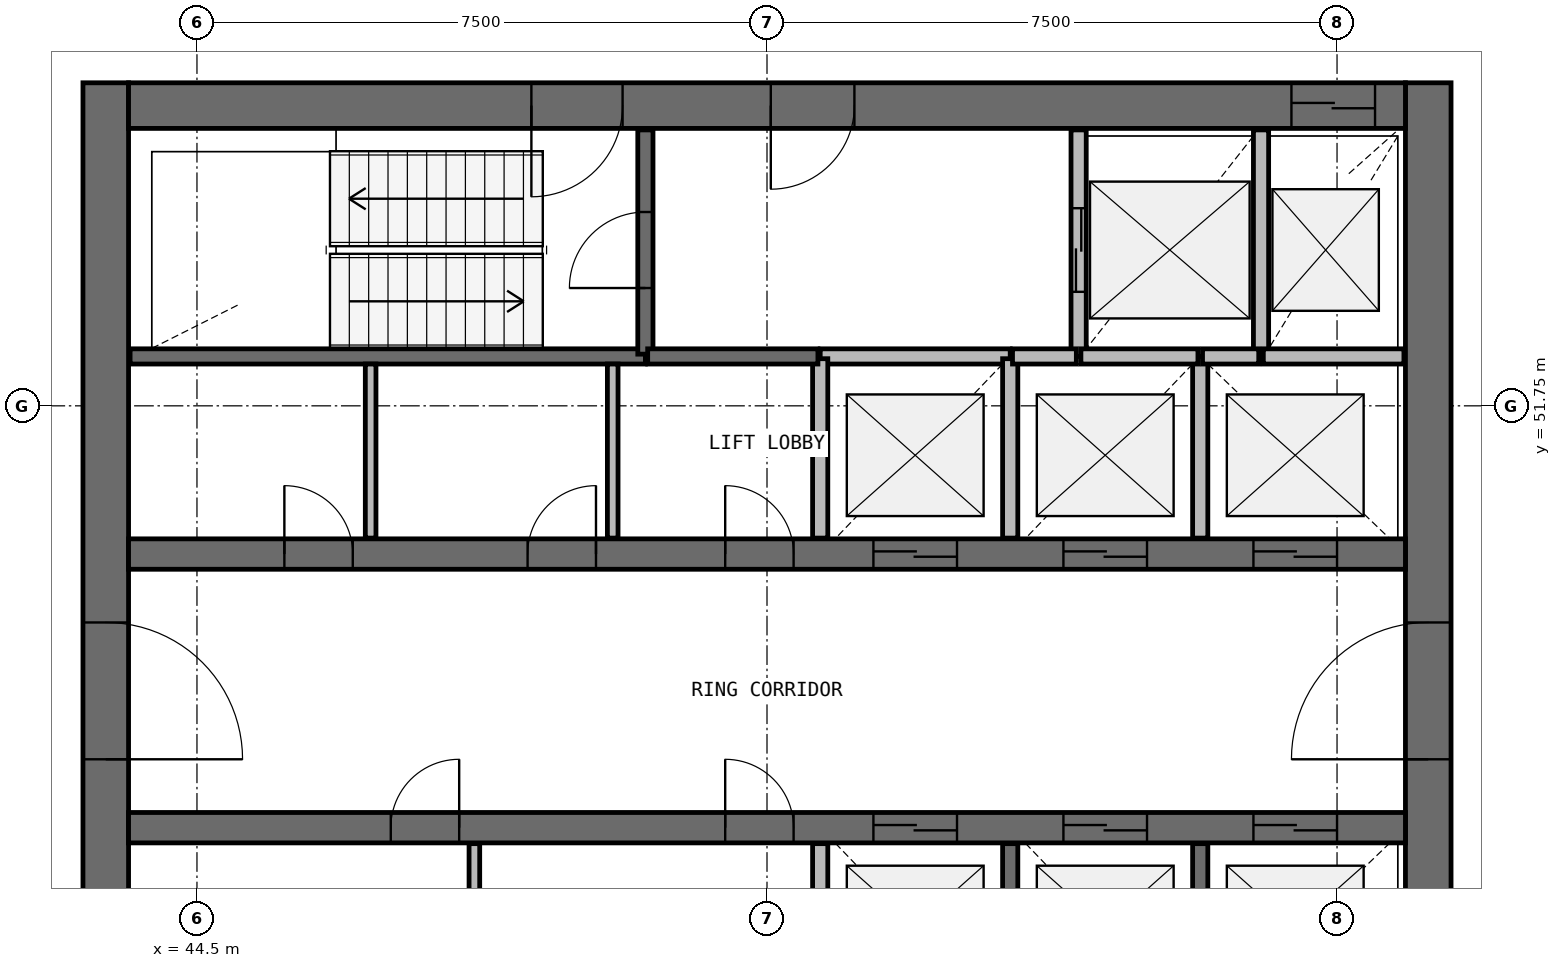
"""IFC4 building model, lengths in metres.
Left out: names, types, materials, properties, quantities, classifications, styles, units other than length and angle.
Written with IfcOpenShell. Run it as: python <this file> out.ifc"""

import sys

from ifc_helpers import new_model, si_unit, direction, frame, frame_2d, origin, place, context, subcontext, project, spatial, rectangle, extrude, source, transform, mapped, element, fill, save


model = new_model("IFC4")
c1 = context("Model", 3, precision=1e-05, world=origin(), true_north=direction((0.0, 1.0)))
c2 = subcontext(c1, "Body", "Model", "MODEL_VIEW")
j1 = project(units=[si_unit("LENGTHUNIT", "METRE"), si_unit("PLANEANGLEUNIT", "RADIAN")], contexts=[c1])
p1 = place(None, origin())
s1 = spatial("IfcSite", under=j1, at=p1, CompositionType="ELEMENT")
p2 = place(p1, origin())
s2 = spatial("IfcBuilding", under=s1, at=p2, CompositionType="ELEMENT")
p3 = place(p2, frame((0.0, 0.0, 242.3)))
s3 = spatial("IfcBuildingStorey", under=s2, at=p3, CompositionType="ELEMENT", Elevation=242.3)
p4 = place(p3, frame((60.7, 40.0, 0.0), z_axis=(0.0, 0.0, 1.0), x_axis=(0.0, 1.0, 0.0)))
e1 = element("IfcWall", 1, at=p4, inside=s3, PredefinedType="SHEAR", context=c2, shape_type="SweptSolid", body=[
    extrude(rectangle(XDim=16.0, YDim=0.6, at=frame_2d((8.0, 0.0))), origin(), (0.0, 0.0, 1.0), 3.9),
])
p5 = place(p4, frame((7.1, 0.0, 0.0)))
e2 = element("IfcOpeningElement", 2, at=p5, cuts=e1, PredefinedType="OPENING", context=c2, shape_type="SweptSolid", body=[
    extrude(rectangle(XDim=1.8, YDim=2.1, at=frame_2d((0.9, 1.05))), frame((0.0, 0.31, 0.0), z_axis=(0.0, -1.0, 0.0), x_axis=(1.0, 0.0, 0.0)), (0.0, 0.0, 1.0), 0.62),
])
p6 = place(p3, frame((43.3, 56.0, 0.0), z_axis=(0.0, 0.0, 1.0), x_axis=(0.0, -1.0, 0.0)))
e3 = element("IfcWall", 3, at=p6, inside=s3, PredefinedType="SHEAR", context=c2, shape_type="SweptSolid", body=[
    extrude(rectangle(XDim=16.0, YDim=0.6, at=frame_2d((8.0, 0.0))), origin(), (0.0, 0.0, 1.0), 3.9),
])
p7 = place(p6, frame((7.1, 0.0, 0.0)))
e4 = element("IfcOpeningElement", 4, at=p7, cuts=e3, PredefinedType="OPENING", context=c2, shape_type="SweptSolid", body=[
    extrude(rectangle(XDim=1.8, YDim=2.1, at=frame_2d((0.9, 1.05))), frame((0.0, 0.31, 0.0), z_axis=(0.0, -1.0, 0.0), x_axis=(1.0, 0.0, 0.0)), (0.0, 0.0, 1.0), 0.62),
])
p8 = place(p3, frame((60.4, 55.7, 0.0), z_axis=(0.0, 0.0, 1.0), x_axis=(-1.0, 0.0, 0.0)))
e5 = element("IfcWall", 5, at=p8, inside=s3, PredefinedType="SHEAR", context=c2, shape_type="SweptSolid", body=[
    extrude(rectangle(XDim=16.8, YDim=0.6, at=frame_2d((8.4, 0.0))), origin(), (0.0, 0.0, 1.0), 3.9),
])
p9 = place(p8, frame((0.4, 0.0, 0.0)))
e6 = element("IfcOpeningElement", 6, at=p9, cuts=e5, PredefinedType="OPENING", context=c2, shape_type="SweptSolid", body=[
    extrude(rectangle(XDim=1.1, YDim=2.1, at=frame_2d((0.55, 1.05))), frame((0.0, 0.31, 0.0), z_axis=(0.0, -1.0, 0.0), x_axis=(1.0, 0.0, 0.0)), (0.0, 0.0, 1.0), 0.62),
])
p10 = place(p8, frame((10.3, 0.0, 0.0)))
e7 = element("IfcOpeningElement", 7, at=p10, cuts=e5, PredefinedType="OPENING", context=c2, shape_type="SweptSolid", body=[
    extrude(rectangle(XDim=1.2, YDim=2.1, at=frame_2d((0.6, 1.05))), frame((0.0, 0.31, 0.0), z_axis=(0.0, -1.0, 0.0), x_axis=(1.0, 0.0, 0.0)), (0.0, 0.0, 1.0), 0.62),
])
p11 = place(p8, frame((7.25, 0.0, 0.0)))
e8 = element("IfcOpeningElement", 8, at=p11, cuts=e5, PredefinedType="OPENING", context=c2, shape_type="SweptSolid", body=[
    extrude(rectangle(XDim=1.1, YDim=2.1, at=frame_2d((0.55, 1.05))), frame((0.0, 0.31, 0.0), z_axis=(0.0, -1.0, 0.0), x_axis=(1.0, 0.0, 0.0)), (0.0, 0.0, 1.0), 0.62),
])
p12 = place(p3, frame((43.6, 49.8, 0.0), z_axis=(0.0, 0.0, 1.0), x_axis=(1.0, 0.0, 0.0)))
e9 = element("IfcWall", 9, at=p12, inside=s3, PredefinedType="SHEAR", context=c2, shape_type="SweptSolid", body=[
    extrude(rectangle(XDim=16.8, YDim=0.4, at=frame_2d((8.4, 0.0))), origin(), (0.0, 0.0, 1.0), 3.9),
])
p13 = place(p12, frame((9.8, 0.0, 0.0)))
e10 = element("IfcOpeningElement", 10, at=p13, cuts=e9, PredefinedType="OPENING", context=c2, shape_type="SweptSolid", body=[
    extrude(rectangle(XDim=1.1, YDim=2.1, at=frame_2d((0.55, 1.05))), frame((0.0, 0.21, 0.0), z_axis=(0.0, -1.0, 0.0), x_axis=(1.0, 0.0, 0.0)), (0.0, 0.0, 1.0), 0.42),
])
p14 = place(p12, frame((12.3, 0.0, 0.0)))
e11 = element("IfcOpeningElement", 11, at=p14, cuts=e9, PredefinedType="OPENING", context=c2, shape_type="SweptSolid", body=[
    extrude(rectangle(XDim=1.1, YDim=2.1, at=frame_2d((0.55, 1.05))), frame((0.0, 0.21, 0.0), z_axis=(0.0, -1.0, 0.0), x_axis=(1.0, 0.0, 0.0)), (0.0, 0.0, 1.0), 0.42),
])
p15 = place(p12, frame((14.8, 0.0, 0.0)))
e12 = element("IfcOpeningElement", 12, at=p15, cuts=e9, PredefinedType="OPENING", context=c2, shape_type="SweptSolid", body=[
    extrude(rectangle(XDim=1.1, YDim=2.1, at=frame_2d((0.55, 1.05))), frame((0.0, 0.21, 0.0), z_axis=(0.0, -1.0, 0.0), x_axis=(1.0, 0.0, 0.0)), (0.0, 0.0, 1.0), 0.42),
])
p16 = place(p12, frame((2.05, 0.0, 0.0)))
e13 = element("IfcOpeningElement", 13, at=p16, cuts=e9, PredefinedType="OPENING", context=c2, shape_type="SweptSolid", body=[
    extrude(rectangle(XDim=0.9, YDim=2.1, at=frame_2d((0.45, 1.05))), frame((0.0, 0.21, 0.0), z_axis=(0.0, -1.0, 0.0), x_axis=(1.0, 0.0, 0.0)), (0.0, 0.0, 1.0), 0.42),
])
p17 = place(p12, frame((5.25, 0.0, 0.0)))
e14 = element("IfcOpeningElement", 14, at=p17, cuts=e9, PredefinedType="OPENING", context=c2, shape_type="SweptSolid", body=[
    extrude(rectangle(XDim=0.9, YDim=2.1, at=frame_2d((0.45, 1.05))), frame((0.0, 0.21, 0.0), z_axis=(0.0, -1.0, 0.0), x_axis=(1.0, 0.0, 0.0)), (0.0, 0.0, 1.0), 0.42),
])
p18 = place(p12, frame((7.85, 0.0, 0.0)))
e15 = element("IfcOpeningElement", 15, at=p18, cuts=e9, PredefinedType="OPENING", context=c2, shape_type="SweptSolid", body=[
    extrude(rectangle(XDim=0.9, YDim=2.1, at=frame_2d((0.45, 1.05))), frame((0.0, 0.21, 0.0), z_axis=(0.0, -1.0, 0.0), x_axis=(1.0, 0.0, 0.0)), (0.0, 0.0, 1.0), 0.42),
])
p19 = place(p3, frame((43.6, 46.2, 0.0), z_axis=(0.0, 0.0, 1.0), x_axis=(1.0, 0.0, 0.0)))
e16 = element("IfcWall", 16, at=p19, inside=s3, PredefinedType="SHEAR", context=c2, shape_type="SweptSolid", body=[
    extrude(rectangle(XDim=16.8, YDim=0.4, at=frame_2d((8.4, 0.0))), origin(), (0.0, 0.0, 1.0), 3.9),
])
p20 = place(p19, frame((9.8, 0.0, 0.0)))
e17 = element("IfcOpeningElement", 17, at=p20, cuts=e16, PredefinedType="OPENING", context=c2, shape_type="SweptSolid", body=[
    extrude(rectangle(XDim=1.1, YDim=2.1, at=frame_2d((0.55, 1.05))), frame((0.0, 0.21, 0.0), z_axis=(0.0, -1.0, 0.0), x_axis=(1.0, 0.0, 0.0)), (0.0, 0.0, 1.0), 0.42),
])
p21 = place(p19, frame((12.3, 0.0, 0.0)))
e18 = element("IfcOpeningElement", 18, at=p21, cuts=e16, PredefinedType="OPENING", context=c2, shape_type="SweptSolid", body=[
    extrude(rectangle(XDim=1.1, YDim=2.1, at=frame_2d((0.55, 1.05))), frame((0.0, 0.21, 0.0), z_axis=(0.0, -1.0, 0.0), x_axis=(1.0, 0.0, 0.0)), (0.0, 0.0, 1.0), 0.42),
])
p22 = place(p19, frame((14.8, 0.0, 0.0)))
e19 = element("IfcOpeningElement", 19, at=p22, cuts=e16, PredefinedType="OPENING", context=c2, shape_type="SweptSolid", body=[
    extrude(rectangle(XDim=1.1, YDim=2.1, at=frame_2d((0.55, 1.05))), frame((0.0, 0.21, 0.0), z_axis=(0.0, -1.0, 0.0), x_axis=(1.0, 0.0, 0.0)), (0.0, 0.0, 1.0), 0.42),
])
p23 = place(p19, frame((3.45, 0.0, 0.0)))
e20 = element("IfcOpeningElement", 20, at=p23, cuts=e16, PredefinedType="OPENING", context=c2, shape_type="SweptSolid", body=[
    extrude(rectangle(XDim=0.9, YDim=2.1, at=frame_2d((0.45, 1.05))), frame((0.0, 0.21, 0.0), z_axis=(0.0, -1.0, 0.0), x_axis=(1.0, 0.0, 0.0)), (0.0, 0.0, 1.0), 0.42),
])
p24 = place(p19, frame((7.85, 0.0, 0.0)))
e21 = element("IfcOpeningElement", 21, at=p24, cuts=e16, PredefinedType="OPENING", context=c2, shape_type="SweptSolid", body=[
    extrude(rectangle(XDim=0.9, YDim=2.1, at=frame_2d((0.45, 1.05))), frame((0.0, 0.21, 0.0), z_axis=(0.0, -1.0, 0.0), x_axis=(1.0, 0.0, 0.0)), (0.0, 0.0, 1.0), 0.42),
])
p25 = place(p3, frame((43.62, 52.4, 0.0), z_axis=(0.0, 0.0, 1.0), x_axis=(1.0, 0.0, 0.0)))
e22 = element("IfcWall", 22, at=p25, inside=s3, PredefinedType="SOLIDWALL", context=c2, shape_type="SweptSolid", body=[
    extrude(rectangle(XDim=6.78, YDim=0.2, at=frame_2d((3.39, 0.0))), origin(), (0.0, 0.0, 1.0), 3.58),
])
p26 = place(p3, frame((50.4, 52.43, 0.0), z_axis=(0.0, 0.0, 1.0), x_axis=(0.0, 1.0, 0.0)))
e23 = element("IfcWall", 23, at=p26, inside=s3, PredefinedType="SOLIDWALL", context=c2, shape_type="SweptSolid", body=[
    extrude(rectangle(XDim=2.95, YDim=0.2, at=frame_2d((1.475, 0.0))), origin(), (0.0, 0.0, 1.0), 3.58),
])
p27 = place(p26, frame((0.87, 0.0, 0.0)))
e24 = element("IfcOpeningElement", 24, at=p27, cuts=e23, PredefinedType="OPENING", context=c2, shape_type="SweptSolid", body=[
    extrude(rectangle(XDim=1.0, YDim=2.1, at=frame_2d((0.5, 1.05))), frame((0.0, 0.11, 0.0), z_axis=(0.0, -1.0, 0.0), x_axis=(1.0, 0.0, 0.0)), (0.0, 0.0, 1.0), 0.22),
])
p28 = place(p3, frame((56.1, 55.38, 0.0), z_axis=(0.0, 0.0, 1.0), x_axis=(0.0, -1.0, 0.0)))
e25 = element("IfcWall", 25, at=p28, inside=s3, PredefinedType="SOLIDWALL", context=c2, shape_type="SweptSolid", body=[
    extrude(rectangle(XDim=2.98, YDim=0.2, at=frame_2d((1.49, 0.0))), origin(), (0.0, 0.0, 1.0), 3.58),
])
p29 = place(p28, frame((1.03, 0.0, 0.0)))
e26 = element("IfcOpeningElement", 26, at=p29, cuts=e25, PredefinedType="OPENING", context=c2, shape_type="SweptSolid", body=[
    extrude(rectangle(XDim=1.1, YDim=2.1, at=frame_2d((0.55, 1.05))), frame((0.0, 0.11, 0.0), z_axis=(0.0, -1.0, 0.0), x_axis=(1.0, 0.0, 0.0)), (0.0, 0.0, 1.0), 0.22),
])
p30 = place(p3, frame((58.5, 52.4, 0.0), z_axis=(0.0, 0.0, 1.0), x_axis=(0.0, 1.0, 0.0)))
e27 = element("IfcWall", 27, at=p30, inside=s3, PredefinedType="SOLIDWALL", context=c2, shape_type="SweptSolid", body=[
    extrude(rectangle(XDim=2.98, YDim=0.2, at=frame_2d((1.49, 0.0))), origin(), (0.0, 0.0, 1.0), 3.58),
])
p31 = place(p3, frame((55.2, 52.4, 0.0), z_axis=(0.0, 0.0, 1.0), x_axis=(-1.0, 0.0, 0.0)))
e28 = element("IfcWall", 28, at=p31, inside=s3, PredefinedType="SOLIDWALL", context=c2, shape_type="SweptSolid", body=[
    extrude(rectangle(XDim=2.5, YDim=0.2, at=frame_2d((1.25, 0.0))), origin(), (0.0, 0.0, 1.0), 3.58),
])
for number, where, z_axis, x_axis in (
    (29, (52.7, 45.99, 0.0), (0.0, 0.0, 1.0), (0.0, -1.0, 0.0)),
    (30, (52.7, 52.37, 0.0), (0.0, 0.0, 1.0), (0.0, -1.0, 0.0)),
    (31, (55.2, 43.63, 0.0), (0.0, 0.0, 1.0), (0.0, 1.0, 0.0)),
    (32, (55.2, 50.01, 0.0), (0.0, 0.0, 1.0), (0.0, 1.0, 0.0)),
    (33, (57.7, 43.63, 0.0), (0.0, 0.0, 1.0), (0.0, 1.0, 0.0)),
):
    element("IfcWall", number, at=place(p3, frame(where, z_axis=z_axis, x_axis=x_axis)), inside=s3, PredefinedType="SOLIDWALL", context=c2, shape_type="SweptSolid", body=[
        extrude(rectangle(XDim=2.36, YDim=0.2, at=frame_2d((1.18, 0.0))), origin(), (0.0, 0.0, 1.0), 3.58),
    ])
p32 = place(p3, frame((57.7, 50.01, 0.0), z_axis=(0.0, 0.0, 1.0), x_axis=(0.0, 1.0, 0.0)))
e34 = element("IfcWall", 34, at=p32, inside=s3, PredefinedType="SOLIDWALL", context=c2, shape_type="SweptSolid", body=[
    extrude(rectangle(XDim=2.39, YDim=0.2, at=frame_2d((1.195, 0.0))), origin(), (0.0, 0.0, 1.0), 3.58),
])
p33 = place(p3, frame((50.43, 52.4, 0.0), z_axis=(0.0, 0.0, 1.0), x_axis=(1.0, 0.0, 0.0)))
e35 = element("IfcWall", 35, at=p33, inside=s3, PredefinedType="SOLIDWALL", context=c2, shape_type="SweptSolid", body=[
    extrude(rectangle(XDim=2.24, YDim=0.2, at=frame_2d((1.12, 0.0))), origin(), (0.0, 0.0, 1.0), 3.58),
])
p34 = place(p3, frame((60.38, 52.4, 0.0), z_axis=(0.0, 0.0, 1.0), x_axis=(-1.0, 0.0, 0.0)))
e36 = element("IfcWall", 36, at=p34, inside=s3, PredefinedType="SOLIDWALL", context=c2, shape_type="SweptSolid", body=[
    extrude(rectangle(XDim=1.85, YDim=0.2, at=frame_2d((0.925, 0.0))), origin(), (0.0, 0.0, 1.0), 3.58),
])
p35 = place(p3, frame((57.67, 52.4, 0.0), z_axis=(0.0, 0.0, 1.0), x_axis=(-1.0, 0.0, 0.0)))
e37 = element("IfcWall", 37, at=p35, inside=s3, PredefinedType="SOLIDWALL", context=c2, shape_type="SweptSolid", body=[
    extrude(rectangle(XDim=1.54, YDim=0.2, at=frame_2d((0.77, 0.0))), origin(), (0.0, 0.0, 1.0), 3.58),
])
p36 = place(p3, frame((56.07, 52.4, 0.0), z_axis=(0.0, 0.0, 1.0), x_axis=(-1.0, 0.0, 0.0)))
e38 = element("IfcWall", 38, at=p36, inside=s3, PredefinedType="SOLIDWALL", context=c2, shape_type="SweptSolid", body=[
    extrude(rectangle(XDim=0.84, YDim=0.2, at=frame_2d((0.42, 0.0))), origin(), (0.0, 0.0, 1.0), 3.58),
])
p37 = place(p3, frame((58.47, 52.4, 0.0), z_axis=(0.0, 0.0, 1.0), x_axis=(-1.0, 0.0, 0.0)))
e39 = element("IfcWall", 39, at=p37, inside=s3, PredefinedType="SOLIDWALL", context=c2, shape_type="SweptSolid", body=[
    extrude(rectangle(XDim=0.74, YDim=0.2, at=frame_2d((0.37, 0.0))), origin(), (0.0, 0.0, 1.0), 3.58),
])
for number, where, z_axis, x_axis in (
    (40, (46.785, 50.01, 0.0), (0.0, 0.0, 1.0), (0.0, 1.0, 0.0)),
    (41, (48.15, 43.7, 0.0), (0.0, 0.0, 1.0), (0.0, 1.0, 0.0)),
    (42, (49.97, 50.01, 0.0), (0.0, 0.0, 1.0), (0.0, 1.0, 0.0)),
):
    element("IfcWall", number, at=place(p3, frame(where, z_axis=z_axis, x_axis=x_axis)), inside=s3, PredefinedType="PARTITIONING", context=c2, shape_type="SweptSolid", body=[
        extrude(rectangle(XDim=2.29, YDim=0.14, at=frame_2d((1.145, 0.0))), origin(), (0.0, 0.0, 1.0), 2.88),
    ])
m1 = source(origin(), c2, "Body", "SweptSolid", [
    extrude(rectangle(XDim=1.8, YDim=2.1, at=frame_2d((0.9, 1.05))), frame((0.0, 0.025, 0.0), z_axis=(0.0, -1.0, 0.0), x_axis=(1.0, 0.0, 0.0)), (0.0, 0.0, 1.0), 0.05),
])
p38 = place(p7, origin())
e43 = element("IfcDoor", 43, at=p38, inside=s3, OperationType="SINGLE_SWING_RIGHT", PredefinedType="DOOR", context=c2, shape_type="MappedRepresentation", body=[
    mapped(m1, transform((0.0, 0.0, 0.0), scale=1.0)),
])
fill(e4, e43)
p39 = place(p5, origin())
e44 = element("IfcDoor", 44, at=p39, inside=s3, OperationType="SINGLE_SWING_LEFT", PredefinedType="DOOR", context=c2, shape_type="MappedRepresentation", body=[
    mapped(m1, transform((0.0, 0.0, 0.0), scale=1.0)),
])
fill(e2, e44)
m2 = source(origin(), c2, "Body", "SweptSolid", [
    extrude(rectangle(XDim=1.1, YDim=2.1, at=frame_2d((0.55, 1.05))), frame((0.0, 0.025, 0.0), z_axis=(0.0, -1.0, 0.0), x_axis=(1.0, 0.0, 0.0)), (0.0, 0.0, 1.0), 0.05),
])
p40 = place(p13, origin())
e45 = element("IfcDoor", 45, at=p40, inside=s3, OperationType="DOUBLE_DOOR_SLIDING", PredefinedType="USERDEFINED", context=c2, shape_type="MappedRepresentation", body=[
    mapped(m2, transform((0.0, 0.0, 0.0), scale=1.0)),
])
fill(e10, e45)
p41 = place(p14, origin())
e46 = element("IfcDoor", 46, at=p41, inside=s3, OperationType="DOUBLE_DOOR_SLIDING", PredefinedType="USERDEFINED", context=c2, shape_type="MappedRepresentation", body=[
    mapped(m2, transform((0.0, 0.0, 0.0), scale=1.0)),
])
fill(e11, e46)
p42 = place(p15, origin())
e47 = element("IfcDoor", 47, at=p42, inside=s3, OperationType="DOUBLE_DOOR_SLIDING", PredefinedType="USERDEFINED", context=c2, shape_type="MappedRepresentation", body=[
    mapped(m2, transform((0.0, 0.0, 0.0), scale=1.0)),
])
fill(e12, e47)
p43 = place(p20, origin())
e48 = element("IfcDoor", 48, at=p43, inside=s3, OperationType="DOUBLE_DOOR_SLIDING", PredefinedType="USERDEFINED", context=c2, shape_type="MappedRepresentation", body=[
    mapped(m2, transform((0.0, 0.0, 0.0), scale=1.0)),
])
fill(e17, e48)
p44 = place(p21, origin())
e49 = element("IfcDoor", 49, at=p44, inside=s3, OperationType="DOUBLE_DOOR_SLIDING", PredefinedType="USERDEFINED", context=c2, shape_type="MappedRepresentation", body=[
    mapped(m2, transform((0.0, 0.0, 0.0), scale=1.0)),
])
fill(e18, e49)
p45 = place(p22, origin())
e50 = element("IfcDoor", 50, at=p45, inside=s3, OperationType="DOUBLE_DOOR_SLIDING", PredefinedType="USERDEFINED", context=c2, shape_type="MappedRepresentation", body=[
    mapped(m2, transform((0.0, 0.0, 0.0), scale=1.0)),
])
fill(e19, e50)
p46 = place(p29, origin())
e51 = element("IfcDoor", 51, at=p46, inside=s3, OperationType="DOUBLE_DOOR_SLIDING", PredefinedType="USERDEFINED", context=c2, shape_type="MappedRepresentation", body=[
    mapped(m2, transform((0.0, 0.0, 0.0), scale=1.0)),
])
fill(e26, e51)
p47 = place(p9, origin())
e52 = element("IfcDoor", 52, at=p47, inside=s3, OperationType="DOUBLE_DOOR_SLIDING", PredefinedType="USERDEFINED", context=c2, shape_type="MappedRepresentation", body=[
    mapped(m2, transform((0.0, 0.0, 0.0), scale=1.0)),
])
fill(e6, e52)
m3 = source(origin(), c2, "Body", "SweptSolid", [
    extrude(rectangle(XDim=1.2, YDim=2.1, at=frame_2d((0.6, 1.05))), frame((0.0, 0.025, 0.0), z_axis=(0.0, -1.0, 0.0), x_axis=(1.0, 0.0, 0.0)), (0.0, 0.0, 1.0), 0.05),
])
p48 = place(p10, origin())
e53 = element("IfcDoor", 53, at=p48, inside=s3, OperationType="SINGLE_SWING_RIGHT", PredefinedType="DOOR", context=c2, shape_type="MappedRepresentation", body=[
    mapped(m3, transform((0.0, 0.0, 0.0), scale=1.0)),
])
fill(e7, e53)
m4 = source(origin(), c2, "Body", "SweptSolid", [
    extrude(rectangle(XDim=1.0, YDim=2.1, at=frame_2d((0.5, 1.05))), frame((0.0, 0.025, 0.0), z_axis=(0.0, -1.0, 0.0), x_axis=(1.0, 0.0, 0.0)), (0.0, 0.0, 1.0), 0.05),
])
p49 = place(p27, origin())
e54 = element("IfcDoor", 54, at=p49, inside=s3, OperationType="SINGLE_SWING_LEFT", PredefinedType="DOOR", context=c2, shape_type="MappedRepresentation", body=[
    mapped(m4, transform((0.0, 0.0, 0.0), scale=1.0)),
])
fill(e24, e54)
m5 = source(origin(), c2, "Body", "SweptSolid", [
    extrude(rectangle(XDim=1.1, YDim=2.1, at=frame_2d((0.55, 1.05))), frame((0.0, 0.025, 0.0), z_axis=(0.0, -1.0, 0.0), x_axis=(1.0, 0.0, 0.0)), (0.0, 0.0, 1.0), 0.05),
])
p50 = place(p11, origin())
e55 = element("IfcDoor", 55, at=p50, inside=s3, OperationType="SINGLE_SWING_RIGHT", PredefinedType="DOOR", context=c2, shape_type="MappedRepresentation", body=[
    mapped(m5, transform((0.0, 0.0, 0.0), scale=1.0)),
])
fill(e8, e55)
m6 = source(origin(), c2, "Body", "SweptSolid", [
    extrude(rectangle(XDim=0.9, YDim=2.1, at=frame_2d((0.45, 1.05))), frame((0.0, 0.025, 0.0), z_axis=(0.0, -1.0, 0.0), x_axis=(1.0, 0.0, 0.0)), (0.0, 0.0, 1.0), 0.05),
])
p51 = place(p16, origin())
e56 = element("IfcDoor", 56, at=p51, inside=s3, OperationType="SINGLE_SWING_LEFT", PredefinedType="DOOR", context=c2, shape_type="MappedRepresentation", body=[
    mapped(m6, transform((0.0, 0.0, 0.0), scale=1.0)),
])
fill(e13, e56)
p52 = place(p17, origin())
e57 = element("IfcDoor", 57, at=p52, inside=s3, OperationType="SINGLE_SWING_RIGHT", PredefinedType="DOOR", context=c2, shape_type="MappedRepresentation", body=[
    mapped(m6, transform((0.0, 0.0, 0.0), scale=1.0)),
])
fill(e14, e57)
p53 = place(p18, origin())
e58 = element("IfcDoor", 58, at=p53, inside=s3, OperationType="SINGLE_SWING_LEFT", PredefinedType="DOOR", context=c2, shape_type="MappedRepresentation", body=[
    mapped(m6, transform((0.0, 0.0, 0.0), scale=1.0)),
])
fill(e15, e58)
p54 = place(p23, origin())
e59 = element("IfcDoor", 59, at=p54, inside=s3, OperationType="SINGLE_SWING_RIGHT", PredefinedType="DOOR", context=c2, shape_type="MappedRepresentation", body=[
    mapped(m6, transform((0.0, 0.0, 0.0), scale=1.0)),
])
fill(e20, e59)
p55 = place(p24, origin())
e60 = element("IfcDoor", 60, at=p55, inside=s3, OperationType="SINGLE_SWING_LEFT", PredefinedType="DOOR", context=c2, shape_type="MappedRepresentation", body=[
    mapped(m6, transform((0.0, 0.0, 0.0), scale=1.0)),
])
fill(e21, e60)
save(model, sys.argv[1])
